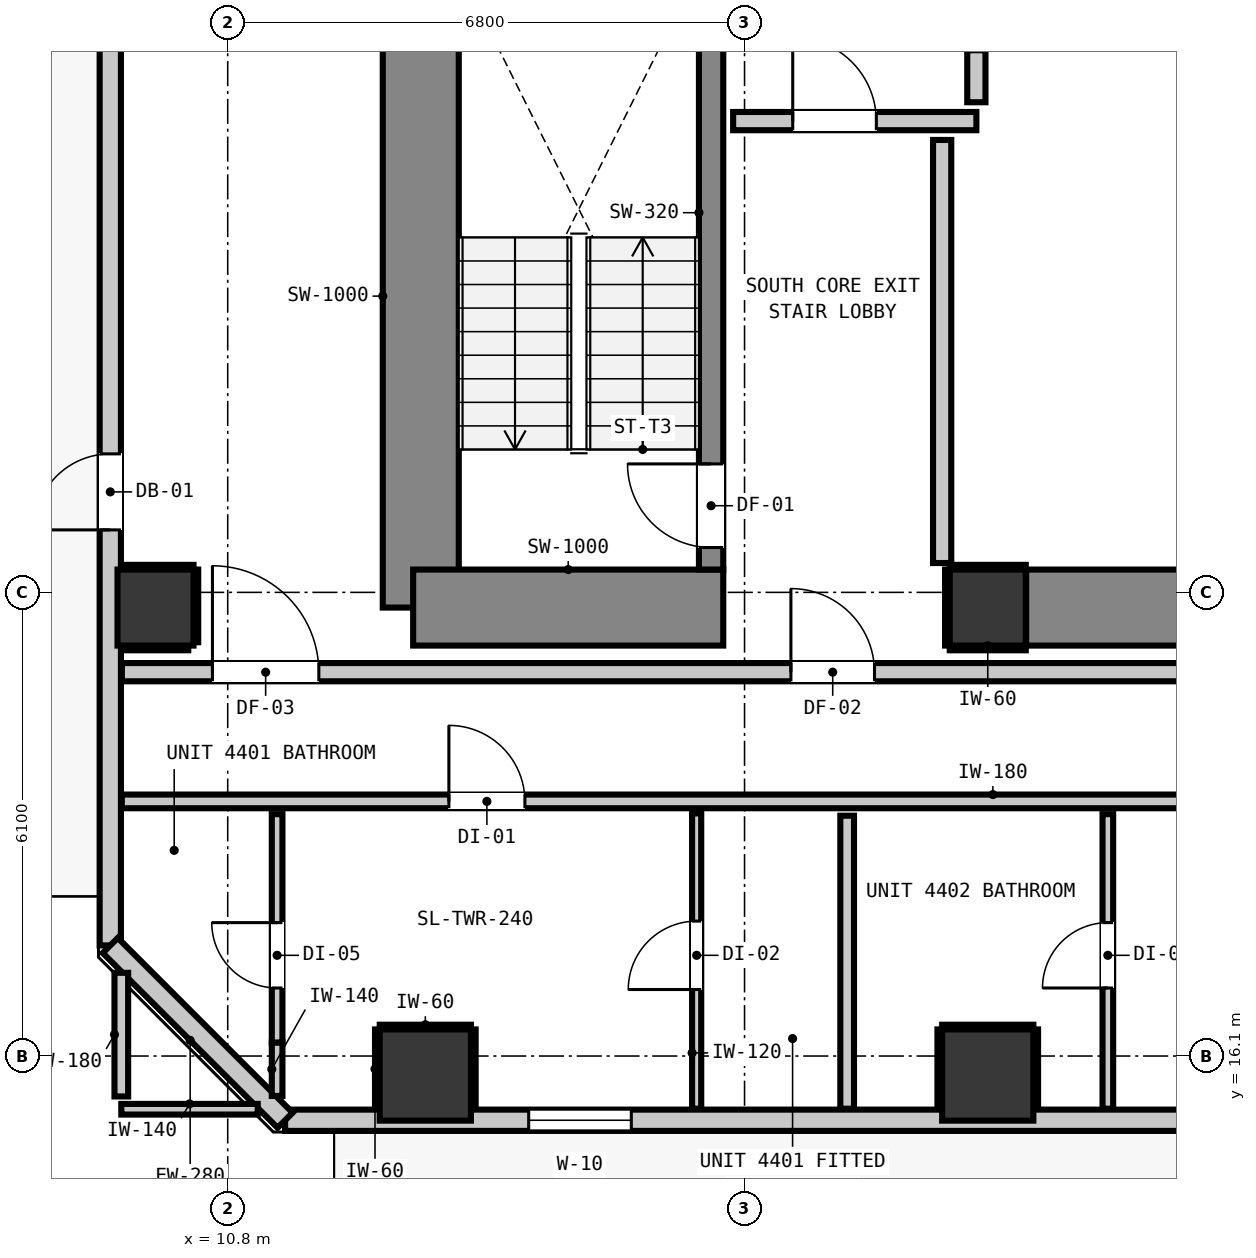
"""IFC4 building model, lengths in metres.
Left out: names, types, materials, properties, quantities, classifications, styles, units other than length and angle.
Written with IfcOpenShell. Run it as: python <this file> out.ifc"""

import sys

from ifc_helpers import new_model, si_unit, direction, frame, frame_2d, origin, origin_2d, place, context, subcontext, project, spatial, rectangle, extrude, element, fill, save


model = new_model("IFC4")
c1 = context("Model", 3, precision=1e-05, world=origin(), true_north=direction((0.0, 1.0)))
c2 = subcontext(c1, "Body", "Model", "MODEL_VIEW")
j1 = project(units=[si_unit("LENGTHUNIT", "METRE"), si_unit("PLANEANGLEUNIT", "RADIAN")], contexts=[c1])
p1 = place(None, origin())
s1 = spatial("IfcSite", under=j1, at=p1, CompositionType="ELEMENT")
p2 = place(p1, origin())
s2 = spatial("IfcBuilding", under=s1, at=p2, CompositionType="ELEMENT")
p3 = place(p2, frame((0.0, 0.0, 152.56)))
s3 = spatial("IfcBuildingStorey", under=s2, at=p3, CompositionType="ELEMENT", Elevation=152.56)
p4 = place(p3, frame((20.8, 22.0, 0.0), z_axis=(0.0, 0.0, 1.0), x_axis=(1.0, 0.0, 0.0)))
e1 = element("IfcColumn", 1, at=p4, inside=s3, PredefinedType="COLUMN", context=c2, shape_type="SweptSolid", body=[
    extrude(rectangle(XDim=1.0, YDim=1.0, at=origin_2d()), origin(), (0.0, 0.0, 1.0), 3.32),
])
p5 = place(p3, frame((13.34, 22.0, 0.0), z_axis=(0.0, 0.0, 1.0), x_axis=(0.0, 1.0, 0.0)))
e2 = element("IfcWall", 2, at=p5, inside=s3, PredefinedType="SHEAR", context=c2, shape_type="SweptSolid", body=[
    extrude(rectangle(XDim=8.195, YDim=1.0, at=frame_2d((4.098, 0.0))), origin(), (0.0, 0.0, 1.0), 3.32),
])
p6 = place(p3, frame((13.24, 22.0, 0.0), z_axis=(0.0, 0.0, 1.0), x_axis=(1.0, 0.0, 0.0)))
e3 = element("IfcWall", 3, at=p6, inside=s3, PredefinedType="SHEAR", context=c2, shape_type="SweptSolid", body=[
    extrude(rectangle(XDim=4.08, YDim=1.0, at=frame_2d((2.04, 0.0))), origin(), (0.0, 0.0, 1.0), 3.32),
])
p7 = place(p3, frame((21.305, 22.0, 0.0), z_axis=(0.0, 0.0, 1.0), x_axis=(1.0, 0.0, 0.0)))
e4 = element("IfcWall", 4, at=p7, inside=s3, PredefinedType="SHEAR", context=c2, shape_type="SweptSolid", body=[
    extrude(rectangle(XDim=7.39, YDim=1.0, at=frame_2d((3.695, 0.0))), origin(), (0.0, 0.0, 1.0), 3.32),
])
p8 = place(p3, frame((17.16, 22.5, 0.0), z_axis=(0.0, 0.0, 1.0), x_axis=(0.0, 1.0, 0.0)))
e5 = element("IfcWall", 5, at=p8, inside=s3, PredefinedType="SHEAR", context=c2, shape_type="SweptSolid", body=[
    extrude(rectangle(XDim=7.9, YDim=0.32, at=frame_2d((3.95, 0.0))), origin(), (0.0, 0.0, 1.0), 3.32),
])
p9 = place(p8, frame((0.29, 0.0, 0.0)))
e6 = element("IfcOpeningElement", 6, at=p9, cuts=e5, PredefinedType="OPENING", context=c2, shape_type="SweptSolid", body=[
    extrude(rectangle(XDim=1.1, YDim=2.15, at=frame_2d((0.55, 1.075))), frame((0.0, 0.17, 0.0), z_axis=(0.0, -1.0, 0.0), x_axis=(1.0, 0.0, 0.0)), (0.0, 0.0, 1.0), 0.34),
])
for number, where, z_axis, x_axis in (
    (7, (13.4, 15.85, 0.0), (0.0, 0.0, 1.0), (1.0, 0.0, 0.0)),
    (8, (20.8, 15.85, 0.0), (0.0, 0.0, 1.0), (1.0, 0.0, 0.0)),
):
    element("IfcColumn", number, at=place(p3, frame(where, z_axis=z_axis, x_axis=x_axis)), inside=s3, PredefinedType="COLUMN", context=c2, shape_type="SweptSolid", body=[
        extrude(rectangle(XDim=1.2, YDim=1.2, at=origin_2d()), origin(), (0.0, 0.0, 1.0), 3.32),
    ])
p10 = place(p3, frame((9.85, 22.0, 0.0), z_axis=(0.0, 0.0, 1.0), x_axis=(1.0, 0.0, 0.0)))
e9 = element("IfcColumn", 9, at=p10, inside=s3, PredefinedType="COLUMN", context=c2, shape_type="SweptSolid", body=[
    extrude(rectangle(XDim=1.0, YDim=1.0, at=origin_2d()), origin(), (0.0, 0.0, 1.0), 3.32),
])
p11 = place(p3, frame((9.255, 17.555, 0.0), z_axis=(0.0, 0.0, 1.0), x_axis=(0.0, 1.0, 0.0)))
e10 = element("IfcWall", 10, at=p11, inside=s3, PredefinedType="STANDARD", context=c2, shape_type="SweptSolid", body=[
    extrude(rectangle(XDim=32.29, YDim=0.28, at=frame_2d((16.145, 0.0))), origin(), (0.0, 0.0, 1.0), 3.08),
])
p12 = place(p11, frame((5.467, 0.0, 0.0)))
e11 = element("IfcOpeningElement", 11, at=p12, cuts=e10, PredefinedType="OPENING", context=c2, shape_type="SweptSolid", body=[
    extrude(rectangle(XDim=1.0, YDim=2.15, at=frame_2d((0.5, 1.075))), frame((0.0, 0.15, 0.0), z_axis=(0.0, -1.0, 0.0), x_axis=(1.0, 0.0, 0.0)), (0.0, 0.0, 1.0), 0.3),
])
p13 = place(p11, frame((30.602, 0.0, 0.85)))
e12 = element("IfcOpeningElement", 12, at=p13, cuts=e10, PredefinedType="OPENING", context=c2, shape_type="SweptSolid", body=[
    extrude(rectangle(XDim=1.35, YDim=1.85, at=frame_2d((0.675, 0.925))), frame((0.0, 0.15, 0.0), z_axis=(0.0, -1.0, 0.0), x_axis=(1.0, 0.0, 0.0)), (0.0, 0.0, 1.0), 0.3),
])
p14 = place(p3, frame((46.645, 15.255, 0.0), z_axis=(0.0, 0.0, 1.0), x_axis=(-1.0, 0.0, 0.0)))
e13 = element("IfcWall", 13, at=p14, inside=s3, PredefinedType="STANDARD", context=c2, shape_type="SweptSolid", body=[
    extrude(rectangle(XDim=35.09, YDim=0.28, at=frame_2d((17.545, 0.0))), origin(), (0.0, 0.0, 1.0), 3.08),
])
p15 = place(p14, frame((0.904, 0.0, 0.0)))
e14 = element("IfcOpeningElement", 14, at=p15, cuts=e13, PredefinedType="OPENING", context=c2, shape_type="SweptSolid", body=[
    extrude(rectangle(XDim=1.0, YDim=2.15, at=frame_2d((0.5, 1.075))), frame((0.0, 0.15, 0.0), z_axis=(0.0, -1.0, 0.0), x_axis=(1.0, 0.0, 0.0)), (0.0, 0.0, 1.0), 0.3),
])
p16 = place(p14, frame((30.535, 0.0, 0.85)))
e15 = element("IfcOpeningElement", 15, at=p16, cuts=e13, PredefinedType="OPENING", context=c2, shape_type="SweptSolid", body=[
    extrude(rectangle(XDim=1.35, YDim=1.85, at=frame_2d((0.675, 0.925))), frame((0.0, 0.15, 0.0), z_axis=(0.0, -1.0, 0.0), x_axis=(1.0, 0.0, 0.0)), (0.0, 0.0, 1.0), 0.3),
])
p17 = place(p14, frame((20.43, 0.0, 0.85)))
e16 = element("IfcOpeningElement", 16, at=p17, cuts=e13, PredefinedType="OPENING", context=c2, shape_type="SweptSolid", body=[
    extrude(rectangle(XDim=1.35, YDim=1.85, at=frame_2d((0.675, 0.925))), frame((0.0, 0.15, 0.0), z_axis=(0.0, -1.0, 0.0), x_axis=(1.0, 0.0, 0.0)), (0.0, 0.0, 1.0), 0.3),
])
p18 = place(p14, frame((4.609, 0.0, 0.85)))
e17 = element("IfcOpeningElement", 17, at=p18, cuts=e13, PredefinedType="OPENING", context=c2, shape_type="SweptSolid", body=[
    extrude(rectangle(XDim=1.35, YDim=1.85, at=frame_2d((0.675, 0.925))), frame((0.0, 0.15, 0.0), z_axis=(0.0, -1.0, 0.0), x_axis=(1.0, 0.0, 0.0)), (0.0, 0.0, 1.0), 0.3),
])
p19 = place(p3, frame((11.555, 15.255, 0.0), z_axis=(0.0, 0.0, 1.0), x_axis=(-0.707106781187, 0.707106781187, 0.0)))
e18 = element("IfcWall", 18, at=p19, inside=s3, PredefinedType="STANDARD", context=c2, shape_type="SweptSolid", body=[
    extrude(rectangle(XDim=3.253, YDim=0.28, at=frame_2d((1.626, 0.0))), origin(), (0.0, 0.0, 1.0), 3.08),
])
p20 = place(p3, frame((9.407, 21.15, 0.0), z_axis=(0.0, 0.0, 1.0), x_axis=(1.0, 0.0, 0.0)))
e19 = element("IfcWall", 19, at=p20, inside=s3, PredefinedType="PARTITIONING", context=c2, shape_type="SweptSolid", body=[
    extrude(rectangle(XDim=27.532, YDim=0.24, at=frame_2d((13.766, 0.0))), origin(), (0.0, 0.0, 1.0), 3.08),
])
p21 = place(p20, frame((8.803, 0.0, 0.0)))
e20 = element("IfcOpeningElement", 20, at=p21, cuts=e19, PredefinedType="OPENING", context=c2, shape_type="SweptSolid", body=[
    extrude(rectangle(XDim=1.1, YDim=2.15, at=frame_2d((0.55, 1.075))), frame((0.0, 0.13, 0.0), z_axis=(0.0, -1.0, 0.0), x_axis=(1.0, 0.0, 0.0)), (0.0, 0.0, 1.0), 0.26),
])
p22 = place(p20, frame((1.192, 0.0, 0.0)))
e21 = element("IfcOpeningElement", 21, at=p22, cuts=e19, PredefinedType="OPENING", context=c2, shape_type="SweptSolid", body=[
    extrude(rectangle(XDim=1.4, YDim=2.15, at=frame_2d((0.7, 1.075))), frame((0.0, 0.13, 0.0), z_axis=(0.0, -1.0, 0.0), x_axis=(1.0, 0.0, 0.0)), (0.0, 0.0, 1.0), 0.26),
])
p23 = place(p3, frame((17.45, 28.4, 0.0), z_axis=(0.0, 0.0, 1.0), x_axis=(1.0, 0.0, 0.0)))
e22 = element("IfcWall", 22, at=p23, inside=s3, PredefinedType="PARTITIONING", context=c2, shape_type="SweptSolid", body=[
    extrude(rectangle(XDim=3.2, YDim=0.24, at=frame_2d((1.6, 0.0))), origin(), (0.0, 0.0, 1.0), 3.08),
])
p24 = place(p23, frame((0.784, 0.0, 0.0)))
e23 = element("IfcOpeningElement", 23, at=p24, cuts=e22, PredefinedType="OPENING", context=c2, shape_type="SweptSolid", body=[
    extrude(rectangle(XDim=1.1, YDim=2.15, at=frame_2d((0.55, 1.075))), frame((0.0, 0.13, 0.0), z_axis=(0.0, -1.0, 0.0), x_axis=(1.0, 0.0, 0.0)), (0.0, 0.0, 1.0), 0.26),
])
p25 = place(p3, frame((9.407, 19.45, 0.0), z_axis=(0.0, 0.0, 1.0), x_axis=(1.0, 0.0, 0.0)))
e24 = element("IfcWall", 24, at=p25, inside=s3, PredefinedType="PARTITIONING", context=c2, shape_type="SweptSolid", body=[
    extrude(rectangle(XDim=27.532, YDim=0.18, at=frame_2d((13.766, 0.0))), origin(), (0.0, 0.0, 1.0), 3.08),
])
p26 = place(p25, frame((4.303, 0.0, 0.0)))
e25 = element("IfcOpeningElement", 25, at=p26, cuts=e24, PredefinedType="OPENING", context=c2, shape_type="SweptSolid", body=[
    extrude(rectangle(XDim=1.0, YDim=2.15, at=frame_2d((0.5, 1.075))), frame((0.0, 0.1, 0.0), z_axis=(0.0, -1.0, 0.0), x_axis=(1.0, 0.0, 0.0)), (0.0, 0.0, 1.0), 0.2),
])
p27 = place(p25, frame((17.618, 0.0, 0.0)))
e26 = element("IfcOpeningElement", 26, at=p27, cuts=e24, PredefinedType="OPENING", context=c2, shape_type="SweptSolid", body=[
    extrude(rectangle(XDim=1.0, YDim=2.15, at=frame_2d((0.5, 1.075))), frame((0.0, 0.1, 0.0), z_axis=(0.0, -1.0, 0.0), x_axis=(1.0, 0.0, 0.0)), (0.0, 0.0, 1.0), 0.2),
])
p28 = place(p3, frame((9.4, 15.4, 0.0), z_axis=(0.0, 0.0, 1.0), x_axis=(1.0, 0.0, 0.0)))
e27 = element("IfcWall", 27, at=p28, inside=s3, PredefinedType="PARTITIONING", context=c2, shape_type="SweptSolid", body=[
    extrude(rectangle(XDim=1.795, YDim=0.14, at=frame_2d((0.897, 0.0))), origin(), (0.0, 0.0, 1.0), 3.08),
])
p29 = place(p3, frame((20.2, 22.586, 0.0), z_axis=(0.0, 0.0, 1.0), x_axis=(0.0, 1.0, 0.0)))
e28 = element("IfcWall", 28, at=p29, inside=s3, PredefinedType="PARTITIONING", context=c2, shape_type="SweptSolid", body=[
    extrude(rectangle(XDim=5.566, YDim=0.24, at=frame_2d((2.783, 0.0))), origin(), (0.0, 0.0, 1.0), 3.08),
])
p30 = place(p3, frame((20.65, 28.648, 0.0), z_axis=(0.0, 0.0, 1.0), x_axis=(0.0, 1.0, 0.0)))
e29 = element("IfcWall", 29, at=p30, inside=s3, PredefinedType="PARTITIONING", context=c2, shape_type="SweptSolid", body=[
    extrude(rectangle(XDim=0.684, YDim=0.24, at=frame_2d((0.342, 0.0))), origin(), (0.0, 0.0, 1.0), 2.315),
])
p31 = place(p3, frame((9.4, 15.568, 0.0), z_axis=(0.0, 0.0, 1.0), x_axis=(0.0, 1.0, 0.0)))
e30 = element("IfcWall", 30, at=p31, inside=s3, PredefinedType="PARTITIONING", context=c2, shape_type="SweptSolid", body=[
    extrude(rectangle(XDim=1.627, YDim=0.18, at=frame_2d((0.813, 0.0))), origin(), (0.0, 0.0, 1.0), 3.08),
])
p32 = place(p3, frame((18.95, 15.407, 0.0), z_axis=(0.0, 0.0, 1.0), x_axis=(0.0, 1.0, 0.0)))
e31 = element("IfcWall", 31, at=p32, inside=s3, PredefinedType="PARTITIONING", context=c2, shape_type="SweptSolid", body=[
    extrude(rectangle(XDim=3.855, YDim=0.18, at=frame_2d((1.927, 0.0))), origin(), (0.0, 0.0, 1.0), 3.08),
])
p33 = place(p3, frame((11.45, 15.575, 0.0), z_axis=(0.0, 0.0, 1.0), x_axis=(0.0, 1.0, 0.0)))
e32 = element("IfcWall", 32, at=p33, inside=s3, PredefinedType="PARTITIONING", context=c2, shape_type="SweptSolid", body=[
    extrude(rectangle(XDim=0.703, YDim=0.14, at=frame_2d((0.352, 0.0))), origin(), (0.0, 0.0, 1.0), 3.08),
])
p34 = place(p3, frame((11.45, 16.278, 0.0), z_axis=(0.0, 0.0, 1.0), x_axis=(0.0, 1.0, 0.0)))
e33 = element("IfcWall", 33, at=p34, inside=s3, PredefinedType="PARTITIONING", context=c2, shape_type="SweptSolid", body=[
    extrude(rectangle(XDim=3.004, YDim=0.14, at=frame_2d((1.502, 0.0))), origin(), (0.0, 0.0, 1.0), 2.565),
])
p35 = place(p34, frame((0.717, 0.0, 0.0)))
e34 = element("IfcOpeningElement", 34, at=p35, cuts=e33, PredefinedType="OPENING", context=c2, shape_type="SweptSolid", body=[
    extrude(rectangle(XDim=0.86, YDim=2.02, at=frame_2d((0.43, 1.01))), frame((0.0, 0.08, 0.0), z_axis=(0.0, -1.0, 0.0), x_axis=(1.0, 0.0, 0.0)), (0.0, 0.0, 1.0), 0.16),
])
p36 = place(p3, frame((22.38, 15.407, 0.0), z_axis=(0.0, 0.0, 1.0), x_axis=(0.0, 1.0, 0.0)))
e35 = element("IfcWall", 35, at=p36, inside=s3, PredefinedType="PARTITIONING", context=c2, shape_type="SweptSolid", body=[
    extrude(rectangle(XDim=3.875, YDim=0.14, at=frame_2d((1.938, 0.0))), origin(), (0.0, 0.0, 1.0), 3.08),
])
p37 = place(p36, frame((1.588, 0.0, 0.0)))
e36 = element("IfcOpeningElement", 36, at=p37, cuts=e35, PredefinedType="OPENING", context=c2, shape_type="SweptSolid", body=[
    extrude(rectangle(XDim=0.86, YDim=2.02, at=frame_2d((0.43, 1.01))), frame((0.0, 0.08, 0.0), z_axis=(0.0, -1.0, 0.0), x_axis=(1.0, 0.0, 0.0)), (0.0, 0.0, 1.0), 0.16),
])
p38 = place(p3, frame((16.97, 15.407, 0.0), z_axis=(0.0, 0.0, 1.0), x_axis=(0.0, 1.0, 0.0)))
e37 = element("IfcWall", 37, at=p38, inside=s3, PredefinedType="PARTITIONING", context=c2, shape_type="SweptSolid", body=[
    extrude(rectangle(XDim=3.885, YDim=0.12, at=frame_2d((1.942, 0.0))), origin(), (0.0, 0.0, 1.0), 3.08),
])
p39 = place(p38, frame((1.568, 0.0, 0.0)))
e38 = element("IfcOpeningElement", 38, at=p39, cuts=e37, PredefinedType="OPENING", context=c2, shape_type="SweptSolid", body=[
    extrude(rectangle(XDim=0.9, YDim=2.1, at=frame_2d((0.45, 1.05))), frame((0.0, 0.07, 0.0), z_axis=(0.0, -1.0, 0.0), x_axis=(1.0, 0.0, 0.0)), (0.0, 0.0, 1.0), 0.14),
])
for number, where, z_axis, x_axis in (
    (39, (20.3, 21.468, 0.0), (0.0, 0.0, 1.0), (1.0, 0.0, 0.0)),
    (40, (20.3, 22.532, 0.0), (0.0, 0.0, 1.0), (1.0, 0.0, 0.0)),
    (41, (20.268, 21.5, 0.0), (0.0, 0.0, 1.0), (0.0, 1.0, 0.0)),
):
    element("IfcWall", number, at=place(p3, frame(where, z_axis=z_axis, x_axis=x_axis)), inside=s3, PredefinedType="PARTITIONING", context=c2, shape_type="SweptSolid", body=[
        extrude(rectangle(XDim=1.0, YDim=0.06, at=frame_2d((0.5, 0.0))), origin(), (0.0, 0.0, 1.0), 1.45),
    ])
p40 = place(p3, frame((12.8, 16.482, 0.0), z_axis=(0.0, 0.0, 1.0), x_axis=(1.0, 0.0, 0.0)))
e42 = element("IfcWall", 42, at=p40, inside=s3, PredefinedType="PARTITIONING", context=c2, shape_type="SweptSolid", body=[
    extrude(rectangle(XDim=1.2, YDim=0.06, at=frame_2d((0.6, 0.0))), origin(), (0.0, 0.0, 1.0), 1.45),
])
for number, where, z_axis, x_axis in (
    (43, (12.768, 15.41, 0.0), (0.0, 0.0, 1.0), (0.0, 1.0, 0.0)),
    (44, (14.032, 15.41, 0.0), (0.0, 0.0, 1.0), (0.0, 1.0, 0.0)),
):
    element("IfcWall", number, at=place(p3, frame(where, z_axis=z_axis, x_axis=x_axis)), inside=s3, PredefinedType="PARTITIONING", context=c2, shape_type="SweptSolid", body=[
        extrude(rectangle(XDim=1.04, YDim=0.06, at=frame_2d((0.52, 0.0))), origin(), (0.0, 0.0, 1.0), 1.45),
    ])
p41 = place(p3, frame((20.2, 16.482, 0.0), z_axis=(0.0, 0.0, 1.0), x_axis=(1.0, 0.0, 0.0)))
e45 = element("IfcWall", 45, at=p41, inside=s3, PredefinedType="PARTITIONING", context=c2, shape_type="SweptSolid", body=[
    extrude(rectangle(XDim=1.2, YDim=0.06, at=frame_2d((0.6, 0.0))), origin(), (0.0, 0.0, 1.0), 1.45),
])
for number, where, z_axis, x_axis in (
    (46, (20.168, 15.41, 0.0), (0.0, 0.0, 1.0), (0.0, 1.0, 0.0)),
    (47, (21.432, 15.41, 0.0), (0.0, 0.0, 1.0), (0.0, 1.0, 0.0)),
):
    element("IfcWall", number, at=place(p3, frame(where, z_axis=z_axis, x_axis=x_axis)), inside=s3, PredefinedType="PARTITIONING", context=c2, shape_type="SweptSolid", body=[
        extrude(rectangle(XDim=1.04, YDim=0.06, at=frame_2d((0.52, 0.0))), origin(), (0.0, 0.0, 1.0), 1.45),
    ])
p42 = place(p3, frame((9.41, 21.468, 0.0), z_axis=(0.0, 0.0, 1.0), x_axis=(1.0, 0.0, 0.0)))
e48 = element("IfcWall", 48, at=p42, inside=s3, PredefinedType="PARTITIONING", context=c2, shape_type="SweptSolid", body=[
    extrude(rectangle(XDim=0.871, YDim=0.06, at=frame_2d((0.436, 0.0))), origin(), (0.0, 0.0, 1.0), 1.45),
])
p43 = place(p3, frame((9.41, 22.532, 0.0), z_axis=(0.0, 0.0, 1.0), x_axis=(1.0, 0.0, 0.0)))
e49 = element("IfcWall", 49, at=p43, inside=s3, PredefinedType="PARTITIONING", context=c2, shape_type="SweptSolid", body=[
    extrude(rectangle(XDim=0.94, YDim=0.06, at=frame_2d((0.47, 0.0))), origin(), (0.0, 0.0, 1.0), 1.45),
])
p44 = place(p3, frame((10.382, 21.544, 0.0), z_axis=(0.0, 0.0, 1.0), x_axis=(0.0, 1.0, 0.0)))
e50 = element("IfcWall", 50, at=p44, inside=s3, PredefinedType="PARTITIONING", context=c2, shape_type="SweptSolid", body=[
    extrude(rectangle(XDim=0.956, YDim=0.06, at=frame_2d((0.478, 0.0))), origin(), (0.0, 0.0, 1.0), 1.45),
])
p45 = place(p12, origin())
e51 = element("IfcDoor", 51, at=p45, inside=s3, OperationType="SINGLE_SWING_LEFT", PredefinedType="DOOR", context=c2, shape_type="SweptSolid", body=[
    extrude(rectangle(XDim=1.0, YDim=2.15, at=frame_2d((0.5, 1.075))), frame((0.0, 0.025, 0.0), z_axis=(0.0, -1.0, 0.0), x_axis=(1.0, 0.0, 0.0)), (0.0, 0.0, 1.0), 0.05),
])
fill(e11, e51)
p46 = place(p16, origin())
e52 = element("IfcWindow", 52, at=p46, inside=s3, PartitioningType="SINGLE_PANEL", PredefinedType="WINDOW", context=c2, shape_type="SweptSolid", body=[
    extrude(rectangle(XDim=1.35, YDim=1.85, at=frame_2d((0.675, 0.925))), frame((0.0, 0.03, 0.0), z_axis=(0.0, -1.0, 0.0), x_axis=(1.0, 0.0, 0.0)), (0.0, 0.0, 1.0), 0.06),
])
fill(e15, e52)
p47 = place(p9, origin())
e53 = element("IfcDoor", 53, at=p47, inside=s3, OperationType="SINGLE_SWING_RIGHT", PredefinedType="DOOR", context=c2, shape_type="SweptSolid", body=[
    extrude(rectangle(XDim=1.1, YDim=2.15, at=frame_2d((0.55, 1.075))), frame((0.0, 0.025, 0.0), z_axis=(0.0, -1.0, 0.0), x_axis=(1.0, 0.0, 0.0)), (0.0, 0.0, 1.0), 0.05),
])
fill(e6, e53)
p48 = place(p24, origin())
e54 = element("IfcDoor", 54, at=p48, inside=s3, OperationType="SINGLE_SWING_LEFT", PredefinedType="DOOR", context=c2, shape_type="SweptSolid", body=[
    extrude(rectangle(XDim=1.1, YDim=2.15, at=frame_2d((0.55, 1.075))), frame((0.0, 0.025, 0.0), z_axis=(0.0, -1.0, 0.0), x_axis=(1.0, 0.0, 0.0)), (0.0, 0.0, 1.0), 0.05),
])
fill(e23, e54)
p49 = place(p21, origin())
e55 = element("IfcDoor", 55, at=p49, inside=s3, OperationType="SINGLE_SWING_LEFT", PredefinedType="DOOR", context=c2, shape_type="SweptSolid", body=[
    extrude(rectangle(XDim=1.1, YDim=2.15, at=frame_2d((0.55, 1.075))), frame((0.0, 0.025, 0.0), z_axis=(0.0, -1.0, 0.0), x_axis=(1.0, 0.0, 0.0)), (0.0, 0.0, 1.0), 0.05),
])
fill(e20, e55)
p50 = place(p22, origin())
e56 = element("IfcDoor", 56, at=p50, inside=s3, OperationType="SINGLE_SWING_LEFT", PredefinedType="DOOR", context=c2, shape_type="SweptSolid", body=[
    extrude(rectangle(XDim=1.4, YDim=2.15, at=frame_2d((0.7, 1.075))), frame((0.0, 0.025, 0.0), z_axis=(0.0, -1.0, 0.0), x_axis=(1.0, 0.0, 0.0)), (0.0, 0.0, 1.0), 0.05),
])
fill(e21, e56)
p51 = place(p26, origin())
e57 = element("IfcDoor", 57, at=p51, inside=s3, OperationType="SINGLE_SWING_LEFT", PredefinedType="DOOR", context=c2, shape_type="SweptSolid", body=[
    extrude(rectangle(XDim=1.0, YDim=2.15, at=frame_2d((0.5, 1.075))), frame((0.0, 0.025, 0.0), z_axis=(0.0, -1.0, 0.0), x_axis=(1.0, 0.0, 0.0)), (0.0, 0.0, 1.0), 0.05),
])
fill(e25, e57)
p52 = place(p35, origin())
e58 = element("IfcDoor", 58, at=p52, inside=s3, OperationType="SINGLE_SWING_RIGHT", PredefinedType="DOOR", context=c2, shape_type="SweptSolid", body=[
    extrude(rectangle(XDim=0.86, YDim=2.02, at=frame_2d((0.43, 1.01))), frame((0.0, 0.025, 0.0), z_axis=(0.0, -1.0, 0.0), x_axis=(1.0, 0.0, 0.0)), (0.0, 0.0, 1.0), 0.05),
])
fill(e34, e58)
p53 = place(p39, origin())
e59 = element("IfcDoor", 59, at=p53, inside=s3, OperationType="SINGLE_SWING_LEFT", PredefinedType="DOOR", context=c2, shape_type="SweptSolid", body=[
    extrude(rectangle(XDim=0.9, YDim=2.1, at=frame_2d((0.45, 1.05))), frame((0.0, 0.025, 0.0), z_axis=(0.0, -1.0, 0.0), x_axis=(1.0, 0.0, 0.0)), (0.0, 0.0, 1.0), 0.05),
])
fill(e38, e59)
p54 = place(p37, origin())
e60 = element("IfcDoor", 60, at=p54, inside=s3, OperationType="SINGLE_SWING_LEFT", PredefinedType="DOOR", context=c2, shape_type="SweptSolid", body=[
    extrude(rectangle(XDim=0.86, YDim=2.02, at=frame_2d((0.43, 1.01))), frame((0.0, 0.025, 0.0), z_axis=(0.0, -1.0, 0.0), x_axis=(1.0, 0.0, 0.0)), (0.0, 0.0, 1.0), 0.05),
])
fill(e36, e60)
save(model, sys.argv[1])
